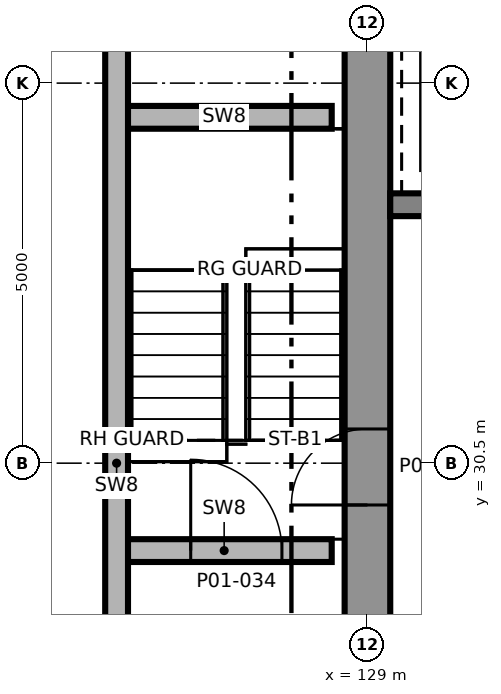
"""IFC4 building model, lengths in metres.
Left out: names, types, materials, properties, quantities, classifications, styles, units other than length and angle.
Written with IfcOpenShell. Run it as: python <this file> out.ifc"""

import sys

from ifc_helpers import new_model, si_unit, direction, frame, frame_2d, origin, place, context, subcontext, project, spatial, rectangle, extrude, element, fill, save


model = new_model("IFC4")
c1 = context("Model", 3, precision=1e-05, world=origin(), true_north=direction((0.0, 1.0)))
c2 = subcontext(c1, "Body", "Model", "MODEL_VIEW")
j1 = project(units=[si_unit("LENGTHUNIT", "METRE"), si_unit("PLANEANGLEUNIT", "RADIAN")], contexts=[c1])
p1 = place(None, origin())
s1 = spatial("IfcSite", under=j1, at=p1, CompositionType="ELEMENT")
p2 = place(p1, origin())
s2 = spatial("IfcBuilding", under=s1, at=p2, CompositionType="ELEMENT")
p3 = place(p2, frame((0.0, 0.0, 8.0)))
s3 = spatial("IfcBuildingStorey", under=s2, at=p3, CompositionType="ELEMENT", Elevation=8.0)
p4 = place(p3, frame((129.0, 24.8, 0.0), z_axis=(0.0, 0.0, 1.0), x_axis=(0.0, 1.0, 0.0)))
e1 = element("IfcWall", 1, at=p4, inside=s3, PredefinedType="SHEAR", context=c2, shape_type="SweptSolid", body=[
    extrude(rectangle(XDim=12.4, YDim=0.6, at=frame_2d((6.2, 0.0))), origin(), (0.0, 0.0, 1.0), 5.5),
])
p5 = place(p4, frame((5.15, 0.0, 0.0)))
e2 = element("IfcOpeningElement", 2, at=p5, cuts=e1, PredefinedType="OPENING", context=c2, shape_type="SweptSolid", body=[
    extrude(rectangle(XDim=1.0, YDim=2.1, at=frame_2d((0.5, 1.05))), frame((0.0, 0.31, 0.0), z_axis=(0.0, -1.0, 0.0), x_axis=(1.0, 0.0, 0.0)), (0.0, 0.0, 1.0), 0.62),
])
p6 = place(p3, frame((129.3, 33.9, 0.0), z_axis=(0.0, 0.0, 1.0), x_axis=(1.0, 0.0, 0.0)))
e3 = element("IfcWall", 3, at=p6, inside=s3, PredefinedType="SHEAR", context=c2, shape_type="SweptSolid", body=[
    extrude(rectangle(XDim=2.65, YDim=0.3, at=frame_2d((1.325, 0.0))), origin(), (0.0, 0.0, 1.0), 5.5),
])
p7 = place(p6, frame((1.05, 0.0, 0.0)))
e4 = element("IfcOpeningElement", 4, at=p7, cuts=e3, PredefinedType="OPENING", context=c2, shape_type="SweptSolid", body=[
    extrude(rectangle(XDim=1.3, YDim=2.4, at=frame_2d((0.65, 1.2))), frame((0.0, 0.16, 0.0), z_axis=(0.0, -1.0, 0.0), x_axis=(1.0, 0.0, 0.0)), (0.0, 0.0, 1.0), 0.32),
])
p8 = place(p3, frame((125.7, 29.35, 0.0), z_axis=(0.0, 0.0, 1.0), x_axis=(1.0, 0.0, 0.0)))
e5 = element("IfcWall", 5, at=p8, inside=s3, PredefinedType="SHEAR", context=c2, shape_type="SweptSolid", body=[
    extrude(rectangle(XDim=2.83, YDim=0.3, at=frame_2d((1.415, 0.0))), origin(), (0.0, 0.0, 1.0), 5.2),
])
p9 = place(p8, frame((0.975, 0.0, 0.0)))
e6 = element("IfcOpeningElement", 6, at=p9, cuts=e5, PredefinedType="OPENING", context=c2, shape_type="SweptSolid", body=[
    extrude(rectangle(XDim=1.2, YDim=2.1, at=frame_2d((0.6, 1.05))), frame((0.0, 0.16, 0.0), z_axis=(0.0, -1.0, 0.0), x_axis=(1.0, 0.0, 0.0)), (0.0, 0.0, 1.0), 0.32),
])
p10 = place(p3, frame((125.7, 35.05, 0.0), z_axis=(0.0, 0.0, 1.0), x_axis=(1.0, 0.0, 0.0)))
e7 = element("IfcWall", 7, at=p10, inside=s3, PredefinedType="SHEAR", context=c2, shape_type="SweptSolid", body=[
    extrude(rectangle(XDim=2.83, YDim=0.3, at=frame_2d((1.415, 0.0))), origin(), (0.0, 0.0, 1.0), 5.2),
])
p11 = place(p3, frame((125.7, 11.07, 0.0), z_axis=(0.0, 0.0, 1.0), x_axis=(0.0, 1.0, 0.0)))
e8 = element("IfcWall", 8, at=p11, inside=s3, PredefinedType="SHEAR", context=c2, shape_type="SweptSolid", body=[
    extrude(rectangle(XDim=38.86, YDim=0.3, at=frame_2d((19.43, 0.0))), origin(), (0.0, 0.0, 1.0), 5.2),
])
p12 = place(p11, frame((14.194, 0.0, 0.0)))
e9 = element("IfcOpeningElement", 9, at=p12, cuts=e8, PredefinedType="OPENING", context=c2, shape_type="SweptSolid", body=[
    extrude(rectangle(XDim=1.0, YDim=2.1, at=frame_2d((0.5, 1.05))), frame((0.0, 0.16, 0.0), z_axis=(0.0, -1.0, 0.0), x_axis=(1.0, 0.0, 0.0)), (0.0, 0.0, 1.0), 0.32),
])
p13 = place(p9, origin())
e10 = element("IfcDoor", 10, at=p13, inside=s3, OperationType="SINGLE_SWING_RIGHT", PredefinedType="DOOR", context=c2, shape_type="SweptSolid", body=[
    extrude(rectangle(XDim=1.2, YDim=2.1, at=frame_2d((0.6, 1.05))), frame((0.0, 0.025, 0.0), z_axis=(0.0, -1.0, 0.0), x_axis=(1.0, 0.0, 0.0)), (0.0, 0.0, 1.0), 0.05),
])
fill(e6, e10)
p14 = place(p5, origin())
e11 = element("IfcDoor", 11, at=p14, inside=s3, OperationType="SINGLE_SWING_RIGHT", PredefinedType="DOOR", context=c2, shape_type="SweptSolid", body=[
    extrude(rectangle(XDim=1.0, YDim=2.1, at=frame_2d((0.5, 1.05))), frame((0.0, 0.025, 0.0), z_axis=(0.0, -1.0, 0.0), x_axis=(1.0, 0.0, 0.0)), (0.0, 0.0, 1.0), 0.05),
])
fill(e2, e11)
save(model, sys.argv[1])
